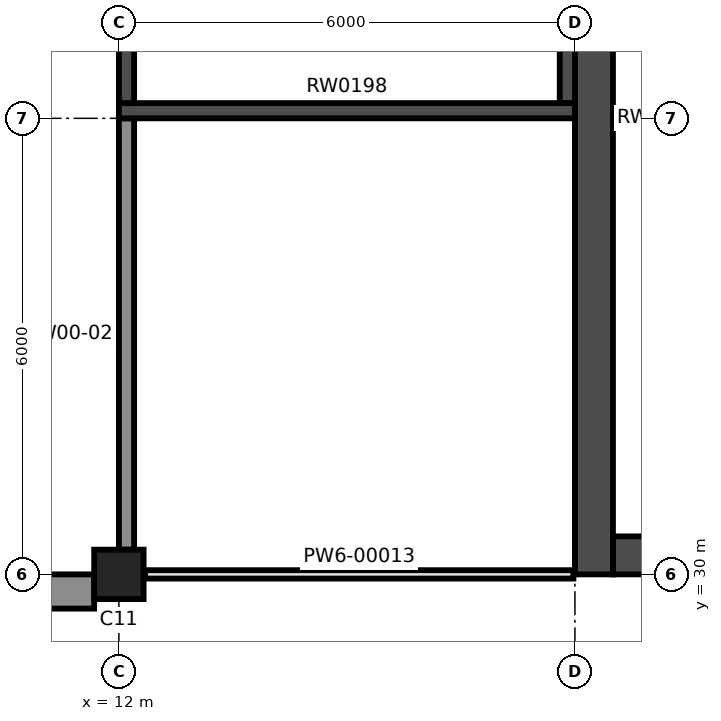
"""IFC4 building model, lengths in metres.
Left out: names, types, materials, properties, quantities, classifications, styles, units other than length and angle.
Written with IfcOpenShell. Run it as: python <this file> out.ifc"""

import sys

from ifc_helpers import new_model, si_unit, direction, frame, frame_2d, origin, origin_2d, place, context, subcontext, project, spatial, rectangle, extrude, element, fill, save


model = new_model("IFC4")
c1 = context("Model", 3, precision=1e-05, world=origin(), true_north=direction((0.0, 1.0)))
c2 = subcontext(c1, "Body", "Model", "MODEL_VIEW")
j1 = project(units=[si_unit("LENGTHUNIT", "METRE"), si_unit("PLANEANGLEUNIT", "RADIAN")], contexts=[c1])
p1 = place(None, origin())
s1 = spatial("IfcSite", under=j1, at=p1, CompositionType="ELEMENT")
p2 = place(p1, origin())
s2 = spatial("IfcBuilding", under=s1, at=p2, CompositionType="ELEMENT")
p3 = place(p2, origin())
s3 = spatial("IfcBuildingStorey", under=s2, at=p3, CompositionType="ELEMENT", Elevation=0.0)
p4 = place(p3, frame((12.0, 30.0, -0.3), z_axis=(0.0, 0.0, 1.0), x_axis=(1.0, 0.0, 0.0)))
e1 = element("IfcColumn", 1, at=p4, inside=s3, PredefinedType="COLUMN", context=c2, shape_type="SweptSolid", body=[
    extrude(rectangle(XDim=0.65, YDim=0.65, at=origin_2d()), origin(), (0.0, 0.0, 1.0), 7.3),
])
p5 = place(p3, frame((12.0, 36.1, -0.3), z_axis=(0.0, 0.0, 1.0), x_axis=(1.0, 0.0, 0.0)))
e2 = element("IfcWall", 2, at=p5, inside=s3, PredefinedType="SHEAR", context=c2, shape_type="SweptSolid", body=[
    extrude(rectangle(XDim=6.0, YDim=0.2, at=frame_2d((3.0, 0.0))), origin(), (0.0, 0.0, 1.0), 7.3),
])
p6 = place(p5, frame((0.3, 0.0, 0.3)))
e3 = element("IfcOpeningElement", 3, at=p6, cuts=e2, PredefinedType="OPENING", context=c2, shape_type="SweptSolid", body=[
    extrude(rectangle(XDim=1.1, YDim=2.2, at=frame_2d((0.55, 1.1))), frame((0.0, 0.11, 0.0), z_axis=(0.0, -1.0, 0.0), x_axis=(1.0, 0.0, 0.0)), (0.0, 0.0, 1.0), 0.22),
])
p7 = place(p3, frame((12.1, 36.2, -0.3), z_axis=(0.0, 0.0, 1.0), x_axis=(0.0, 1.0, 0.0)))
e4 = element("IfcWall", 4, at=p7, inside=s3, PredefinedType="SHEAR", context=c2, shape_type="SweptSolid", body=[
    extrude(rectangle(XDim=5.6, YDim=0.2, at=frame_2d((2.8, 0.0))), origin(), (0.0, 0.0, 1.0), 7.3),
])
p8 = place(p7, frame((1.9, 0.0, 0.3)))
e5 = element("IfcOpeningElement", 5, at=p8, cuts=e4, PredefinedType="OPENING", context=c2, shape_type="SweptSolid", body=[
    extrude(rectangle(XDim=1.8, YDim=2.4, at=frame_2d((0.9, 1.2))), frame((0.0, 0.11, 0.0), z_axis=(0.0, -1.0, 0.0), x_axis=(1.0, 0.0, 0.0)), (0.0, 0.0, 1.0), 0.22),
])
p9 = place(p3, frame((17.9, 36.2, -0.3), z_axis=(0.0, 0.0, 1.0), x_axis=(0.0, 1.0, 0.0)))
e6 = element("IfcWall", 6, at=p9, inside=s3, PredefinedType="SHEAR", context=c2, shape_type="SweptSolid", body=[
    extrude(rectangle(XDim=5.6, YDim=0.2, at=frame_2d((2.8, 0.0))), origin(), (0.0, 0.0, 1.0), 7.3),
])
p10 = place(p3, frame((18.25, 30.0, -0.3), z_axis=(0.0, 0.0, 1.0), x_axis=(0.0, 1.0, 0.0)))
e7 = element("IfcWall", 7, at=p10, inside=s3, PredefinedType="SHEAR", context=c2, shape_type="SweptSolid", body=[
    extrude(rectangle(XDim=24.0, YDim=0.5, at=frame_2d((12.0, 0.0))), origin(), (0.0, 0.0, 1.0), 7.3),
])
p11 = place(p10, frame((16.95, 0.0, 0.3)))
e8 = element("IfcOpeningElement", 8, at=p11, cuts=e7, PredefinedType="OPENING", context=c2, shape_type="SweptSolid", body=[
    extrude(rectangle(XDim=2.1, YDim=2.4, at=frame_2d((1.05, 1.2))), frame((0.0, 0.26, 0.0), z_axis=(0.0, -1.0, 0.0), x_axis=(1.0, 0.0, 0.0)), (0.0, 0.0, 1.0), 0.52),
])
p12 = place(p10, frame((2.25, 0.0, 0.3)))
e9 = element("IfcOpeningElement", 9, at=p12, cuts=e7, PredefinedType="OPENING", context=c2, shape_type="SweptSolid", body=[
    extrude(rectangle(XDim=1.5, YDim=2.1, at=frame_2d((0.75, 1.05))), frame((0.0, 0.26, 0.0), z_axis=(0.0, -1.0, 0.0), x_axis=(1.0, 0.0, 0.0)), (0.0, 0.0, 1.0), 0.52),
])
p13 = place(p3, frame((18.5, 30.25, -0.3), z_axis=(0.0, 0.0, 1.0), x_axis=(1.0, 0.0, 0.0)))
e10 = element("IfcWall", 10, at=p13, inside=s3, PredefinedType="SHEAR", context=c2, shape_type="SweptSolid", body=[
    extrude(rectangle(XDim=29.0, YDim=0.5, at=frame_2d((14.5, 0.0))), origin(), (0.0, 0.0, 1.0), 7.3),
])
p14 = place(p3, frame((6.0, 29.775, 0.0), z_axis=(0.0, 0.0, 1.0), x_axis=(1.0, 0.0, 0.0)))
e11 = element("IfcWall", 11, at=p14, inside=s3, PredefinedType="SOLIDWALL", context=c2, shape_type="SweptSolid", body=[
    extrude(rectangle(XDim=5.675, YDim=0.45, at=frame_2d((2.837, 0.0))), origin(), (0.0, 0.0, 1.0), 6.05),
])
p15 = place(p14, frame((1.538, 0.0, 0.9)))
e12 = element("IfcOpeningElement", 12, at=p15, cuts=e11, PredefinedType="OPENING", context=c2, shape_type="SweptSolid", body=[
    extrude(rectangle(XDim=1.05, YDim=4.95, at=frame_2d((0.525, 2.475))), frame((0.0, 0.235, 0.0), z_axis=(0.0, -1.0, 0.0), x_axis=(1.0, 0.0, 0.0)), (0.0, 0.0, 1.0), 0.47),
])
p16 = place(p14, frame((3.088, 0.0, 0.9)))
e13 = element("IfcOpeningElement", 13, at=p16, cuts=e11, PredefinedType="OPENING", context=c2, shape_type="SweptSolid", body=[
    extrude(rectangle(XDim=1.05, YDim=4.95, at=frame_2d((0.525, 2.475))), frame((0.0, 0.235, 0.0), z_axis=(0.0, -1.0, 0.0), x_axis=(1.0, 0.0, 0.0)), (0.0, 0.0, 1.0), 0.47),
])
p17 = place(p3, frame((12.1, 30.325, 0.0), z_axis=(0.0, 0.0, 1.0), x_axis=(0.0, 1.0, 0.0)))
e14 = element("IfcWall", 14, at=p17, inside=s3, PredefinedType="SOLIDWALL", context=c2, shape_type="SweptSolid", body=[
    extrude(rectangle(XDim=5.675, YDim=0.2, at=frame_2d((2.837, 0.0))), origin(), (0.0, 0.0, 1.0), 6.05),
])
p18 = place(p17, frame((1.745, 0.0, 0.0)))
e15 = element("IfcOpeningElement", 15, at=p18, cuts=e14, PredefinedType="OPENING", context=c2, shape_type="SweptSolid", body=[
    extrude(rectangle(XDim=1.8, YDim=2.4, at=frame_2d((0.9, 1.2))), frame((0.0, 0.11, 0.0), z_axis=(0.0, -1.0, 0.0), x_axis=(1.0, 0.0, 0.0)), (0.0, 0.0, 1.0), 0.22),
])
p19 = place(p17, frame((1.745, 0.0, 2.5)))
e16 = element("IfcOpeningElement", 16, at=p19, cuts=e14, PredefinedType="OPENING", context=c2, shape_type="SweptSolid", body=[
    extrude(rectangle(XDim=1.8, YDim=3.2, at=frame_2d((0.9, 1.6))), frame((0.0, 0.11, 0.0), z_axis=(0.0, -1.0, 0.0), x_axis=(1.0, 0.0, 0.0)), (0.0, 0.0, 1.0), 0.22),
])
p20 = place(p17, frame((0.2, 0.0, 0.1)))
e17 = element("IfcOpeningElement", 17, at=p20, cuts=e14, PredefinedType="OPENING", context=c2, shape_type="SweptSolid", body=[
    extrude(rectangle(XDim=1.545, YDim=5.6, at=frame_2d((0.772, 2.8))), frame((0.0, 0.11, 0.0), z_axis=(0.0, -1.0, 0.0), x_axis=(1.0, 0.0, 0.0)), (0.0, 0.0, 1.0), 0.22),
])
p21 = place(p17, frame((3.545, 0.0, 0.1)))
e18 = element("IfcOpeningElement", 18, at=p21, cuts=e14, PredefinedType="OPENING", context=c2, shape_type="SweptSolid", body=[
    extrude(rectangle(XDim=1.93, YDim=5.6, at=frame_2d((0.965, 2.8))), frame((0.0, 0.11, 0.0), z_axis=(0.0, -1.0, 0.0), x_axis=(1.0, 0.0, 0.0)), (0.0, 0.0, 1.0), 0.22),
])
p22 = place(p3, frame((12.345, 30.0, 0.0), z_axis=(0.0, 0.0, 1.0), x_axis=(1.0, 0.0, 0.0)))
e19 = element("IfcWall", 19, at=p22, inside=s3, PredefinedType="PARTITIONING", context=c2, shape_type="SweptSolid", body=[
    extrude(rectangle(XDim=5.635, YDim=0.11, at=frame_2d((2.817, 0.0))), origin(), (0.0, 0.0, 1.0), 6.05),
])
p23 = place(p18, origin())
e20 = element("IfcDoor", 20, at=p23, inside=s3, OperationType="DOUBLE_DOOR_SINGLE_SWING", PredefinedType="DOOR", context=c2, shape_type="SweptSolid", body=[
    extrude(rectangle(XDim=1.8, YDim=2.4, at=frame_2d((0.9, 1.2))), frame((0.0, 0.025, 0.0), z_axis=(0.0, -1.0, 0.0), x_axis=(1.0, 0.0, 0.0)), (0.0, 0.0, 1.0), 0.05),
])
fill(e15, e20)
p24 = place(p19, origin())
e21 = element("IfcWindow", 21, at=p24, inside=s3, PartitioningType="SINGLE_PANEL", PredefinedType="WINDOW", context=c2, shape_type="SweptSolid", body=[
    extrude(rectangle(XDim=1.8, YDim=3.2, at=frame_2d((0.9, 1.6))), frame((0.0, 0.03, 0.0), z_axis=(0.0, -1.0, 0.0), x_axis=(1.0, 0.0, 0.0)), (0.0, 0.0, 1.0), 0.06),
])
fill(e16, e21)
p25 = place(p20, origin())
e22 = element("IfcWindow", 22, at=p25, inside=s3, PartitioningType="SINGLE_PANEL", PredefinedType="WINDOW", context=c2, shape_type="SweptSolid", body=[
    extrude(rectangle(XDim=1.545, YDim=5.6, at=frame_2d((0.772, 2.8))), frame((0.0, 0.03, 0.0), z_axis=(0.0, -1.0, 0.0), x_axis=(1.0, 0.0, 0.0)), (0.0, 0.0, 1.0), 0.06),
])
fill(e17, e22)
p26 = place(p21, origin())
e23 = element("IfcWindow", 23, at=p26, inside=s3, PartitioningType="SINGLE_PANEL", PredefinedType="WINDOW", context=c2, shape_type="SweptSolid", body=[
    extrude(rectangle(XDim=1.93, YDim=5.6, at=frame_2d((0.965, 2.8))), frame((0.0, 0.03, 0.0), z_axis=(0.0, -1.0, 0.0), x_axis=(1.0, 0.0, 0.0)), (0.0, 0.0, 1.0), 0.06),
])
fill(e18, e23)
p27 = place(p12, frame((1.5, 0.0, 0.0), z_axis=(0.0, 0.0, 1.0), x_axis=(-1.0, 0.0, 0.0)))
e24 = element("IfcDoor", 24, at=p27, inside=s3, OperationType="DOUBLE_DOOR_SINGLE_SWING", PredefinedType="DOOR", context=c2, shape_type="SweptSolid", body=[
    extrude(rectangle(XDim=1.5, YDim=2.1, at=frame_2d((0.75, 1.05))), frame((0.0, 0.025, 0.0), z_axis=(0.0, -1.0, 0.0), x_axis=(1.0, 0.0, 0.0)), (0.0, 0.0, 1.0), 0.05),
])
fill(e9, e24)
p28 = place(p6, origin())
e25 = element("IfcDoor", 25, at=p28, inside=s3, OperationType="SINGLE_SWING_RIGHT", PredefinedType="DOOR", context=c2, shape_type="SweptSolid", body=[
    extrude(rectangle(XDim=1.1, YDim=2.2, at=frame_2d((0.55, 1.1))), frame((0.0, 0.025, 0.0), z_axis=(0.0, -1.0, 0.0), x_axis=(1.0, 0.0, 0.0)), (0.0, 0.0, 1.0), 0.05),
])
fill(e3, e25)
save(model, sys.argv[1])
